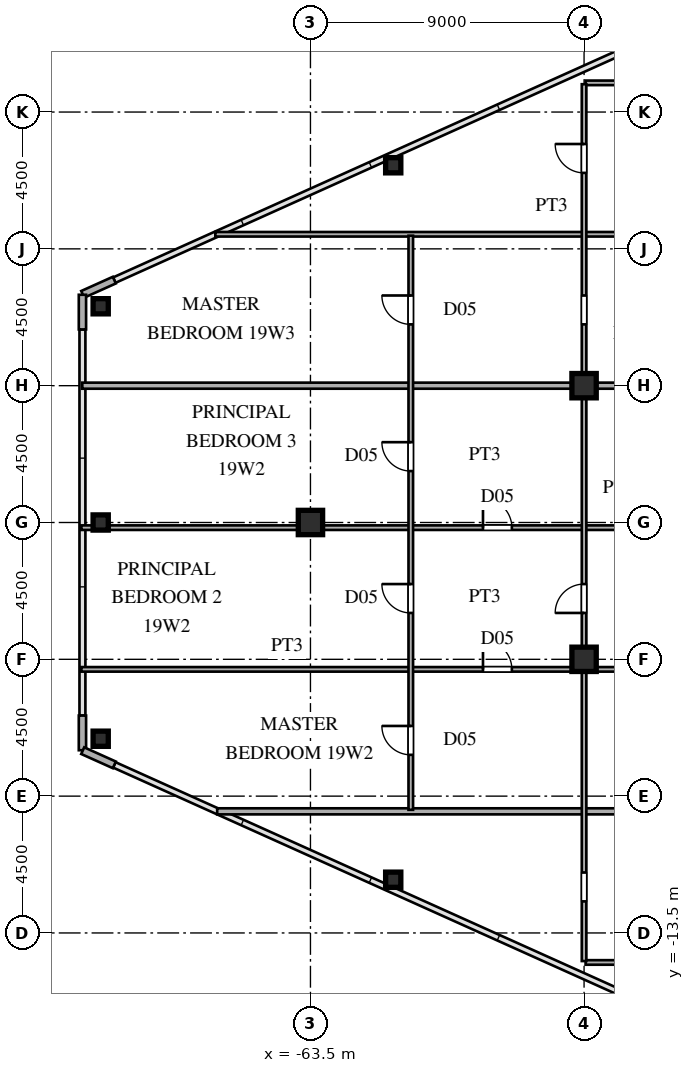
"""IFC4 building model, lengths in metres.
Left out: names, types, materials, properties, quantities, classifications, styles, units other than length and angle.
Written with IfcOpenShell. Run it as: python <this file> out.ifc"""

import sys

from ifc_helpers import new_model, si_unit, direction, frame, frame_2d, origin, origin_2d, place, context, subcontext, project, spatial, rectangle, hollow_rectangle, i_section, extrude, source, transform, mapped, element, fill, save


model = new_model("IFC4")
c1 = context("Model", 3, precision=1e-05, world=origin(), true_north=direction((0.0, 1.0)))
c2 = subcontext(c1, "Body", "Model", "MODEL_VIEW")
j1 = project(units=[si_unit("LENGTHUNIT", "METRE"), si_unit("PLANEANGLEUNIT", "RADIAN")], contexts=[c1])
p1 = place(None, origin())
s1 = spatial("IfcSite", under=j1, at=p1, CompositionType="ELEMENT")
p2 = place(p1, origin())
s2 = spatial("IfcBuilding", under=s1, at=p2, CompositionType="ELEMENT")
p3 = place(p2, frame((0.0, 0.0, 72.9)))
s3 = spatial("IfcBuildingStorey", under=s2, at=p3, CompositionType="ELEMENT", Elevation=72.9)
m1 = source(origin(), c2, "Body", "SweptSolid", [
    extrude(i_section(OverallWidth=0.8, OverallDepth=0.8, WebThickness=0.032, FlangeThickness=0.05, at=origin_2d()), origin(), (0.0, 0.0, 1.0), 3.6),
])
for number, where, z_axis, x_axis in (
    (1, (-54.5, -4.5, 0.0), (0.0, 0.0, 1.0), (1.0, 0.0, 0.0)),
    (2, (-54.5, 4.5, 0.0), (0.0, 0.0, 1.0), (1.0, 0.0, 0.0)),
    (3, (-63.5, 0.0, 0.0), (0.0, 0.0, 1.0), (1.0, 0.0, 0.0)),
):
    element("IfcColumn", number, at=place(p3, frame(where, z_axis=z_axis, x_axis=x_axis)), inside=s3, PredefinedType="COLUMN", context=c2, shape_type="MappedRepresentation", body=[
        mapped(m1, transform((0.0, 0.0, 0.0), scale=1.0)),
    ])
m2 = source(origin(), c2, "Body", "SweptSolid", [
    extrude(hollow_rectangle(XDim=0.5, YDim=0.5, WallThickness=0.02, at=origin_2d()), origin(), (0.0, 0.0, 1.0), 3.6),
])
for number, where, z_axis, x_axis in (
    (4, (-70.4, 7.112, 0.0), (0.0, 0.0, 1.0), (1.0, 0.0, 0.0)),
    (5, (-70.4, -7.112, 0.0), (0.0, 0.0, 1.0), (1.0, 0.0, 0.0)),
    (6, (-60.778, -11.749, 0.0), (0.0, 0.0, 1.0), (1.0, 0.0, 0.0)),
    (7, (-60.778, 11.749, 0.0), (0.0, 0.0, 1.0), (1.0, 0.0, 0.0)),
    (8, (-70.4, 0.0, 0.0), (0.0, 0.0, 1.0), (1.0, 0.0, 0.0)),
):
    element("IfcColumn", number, at=place(p3, frame(where, z_axis=z_axis, x_axis=x_axis)), inside=s3, PredefinedType="COLUMN", context=c2, shape_type="MappedRepresentation", body=[
        mapped(m2, transform((0.0, 0.0, 0.0), scale=1.0)),
    ])
for number, where, z_axis, x_axis in (
    (9, (-69.951, 7.972, 0.0), (0.0, 0.0, 1.0), (-0.912, -0.41, 0.0)),
    (10, (-71.0, 7.49, 0.0), (0.0, 0.0, 1.0), (0.0, -1.0, 0.0)),
    (11, (-71.0, -6.35, 0.0), (0.0, 0.0, 1.0), (0.0, -1.0, 0.0)),
    (12, (-70.991, -7.504, 0.0), (0.0, 0.0, 1.0), (0.912, -0.41, 0.0)),
):
    element("IfcWall", number, at=place(p3, frame(where, z_axis=z_axis, x_axis=x_axis)), inside=s3, PredefinedType="SOLIDWALL", context=c2, shape_type="SweptSolid", body=[
        extrude(rectangle(XDim=1.14, YDim=0.24, at=frame_2d((0.57, 0.0))), origin(), (0.0, 0.0, 1.0), 3.38),
    ])
p4 = place(p3, frame((-54.45, -14.47, 0.0), z_axis=(0.0, 0.0, 1.0), x_axis=(1.0, 0.0, 0.0)))
e13 = element("IfcWall", 13, at=p4, inside=s3, PredefinedType="PARTITIONING", context=c2, shape_type="SweptSolid", body=[
    extrude(rectangle(XDim=9.95, YDim=0.15, at=frame_2d((4.975, 0.0))), origin(), (0.0, 0.0, 1.0), 3.38),
])
p5 = place(p4, frame((4.5, 0.0, 0.0)))
e14 = element("IfcOpeningElement", 14, at=p5, cuts=e13, PredefinedType="OPENING", context=c2, shape_type="SweptSolid", body=[
    extrude(rectangle(XDim=0.95, YDim=2.15, at=frame_2d((0.475, 1.075))), frame((0.0, 0.085, 0.0), z_axis=(0.0, -1.0, 0.0), x_axis=(1.0, 0.0, 0.0)), (0.0, 0.0, 1.0), 0.17),
])
p6 = place(p3, frame((-66.568, -9.5, 0.0), z_axis=(0.0, 0.0, 1.0), x_axis=(1.0, 0.0, 0.0)))
e15 = element("IfcWall", 15, at=p6, inside=s3, PredefinedType="PARTITIONING", context=c2, shape_type="SweptSolid", body=[
    extrude(rectangle(XDim=28.188, YDim=0.2, at=frame_2d((14.094, 0.0))), origin(), (0.0, 0.0, 1.0), 3.38),
])
p7 = place(p3, frame((-71.035, -4.83, 0.0), z_axis=(0.0, 0.0, 1.0), x_axis=(1.0, 0.0, 0.0)))
e16 = element("IfcWall", 16, at=p7, inside=s3, PredefinedType="PARTITIONING", context=c2, shape_type="SweptSolid", body=[
    extrude(rectangle(XDim=26.535, YDim=0.15, at=frame_2d((13.268, 0.0))), origin(), (0.0, 0.0, 1.0), 3.38),
])
p8 = place(p7, frame((21.085, 0.0, 0.0)))
e17 = element("IfcOpeningElement", 17, at=p8, cuts=e16, PredefinedType="OPENING", context=c2, shape_type="SweptSolid", body=[
    extrude(rectangle(XDim=0.95, YDim=2.15, at=frame_2d((0.475, 1.075))), frame((0.0, 0.085, 0.0), z_axis=(0.0, -1.0, 0.0), x_axis=(1.0, 0.0, 0.0)), (0.0, 0.0, 1.0), 0.17),
])
p9 = place(p7, frame((13.21, 0.0, 0.0)))
e18 = element("IfcOpeningElement", 18, at=p9, cuts=e16, PredefinedType="OPENING", context=c2, shape_type="SweptSolid", body=[
    extrude(rectangle(XDim=0.95, YDim=2.15, at=frame_2d((0.475, 1.075))), frame((0.0, 0.085, 0.0), z_axis=(0.0, -1.0, 0.0), x_axis=(1.0, 0.0, 0.0)), (0.0, 0.0, 1.0), 0.17),
])
p10 = place(p3, frame((-71.035, -0.17, 0.0), z_axis=(0.0, 0.0, 1.0), x_axis=(1.0, 0.0, 0.0)))
e19 = element("IfcWall", 19, at=p10, inside=s3, PredefinedType="PARTITIONING", context=c2, shape_type="SweptSolid", body=[
    extrude(rectangle(XDim=26.535, YDim=0.15, at=frame_2d((13.268, 0.0))), origin(), (0.0, 0.0, 1.0), 3.38),
])
p11 = place(p10, frame((21.085, 0.0, 0.0)))
e20 = element("IfcOpeningElement", 20, at=p11, cuts=e19, PredefinedType="OPENING", context=c2, shape_type="SweptSolid", body=[
    extrude(rectangle(XDim=0.95, YDim=2.15, at=frame_2d((0.475, 1.075))), frame((0.0, 0.085, 0.0), z_axis=(0.0, -1.0, 0.0), x_axis=(1.0, 0.0, 0.0)), (0.0, 0.0, 1.0), 0.17),
])
p12 = place(p10, frame((13.21, 0.0, 0.0)))
e21 = element("IfcOpeningElement", 21, at=p12, cuts=e19, PredefinedType="OPENING", context=c2, shape_type="SweptSolid", body=[
    extrude(rectangle(XDim=0.95, YDim=2.15, at=frame_2d((0.475, 1.075))), frame((0.0, 0.085, 0.0), z_axis=(0.0, -1.0, 0.0), x_axis=(1.0, 0.0, 0.0)), (0.0, 0.0, 1.0), 0.17),
])
p13 = place(p3, frame((-71.005, 4.5, 0.0), z_axis=(0.0, 0.0, 1.0), x_axis=(1.0, 0.0, 0.0)))
e22 = element("IfcWall", 22, at=p13, inside=s3, PredefinedType="PARTITIONING", context=c2, shape_type="SweptSolid", body=[
    extrude(rectangle(XDim=16.485, YDim=0.2, at=frame_2d((8.242, 0.0))), origin(), (0.0, 0.0, 1.0), 3.38),
])
p14 = place(p3, frame((-54.52, 4.5, 0.0), z_axis=(0.0, 0.0, 1.0), x_axis=(1.0, 0.0, 0.0)))
e23 = element("IfcWall", 23, at=p14, inside=s3, PredefinedType="PARTITIONING", context=c2, shape_type="SweptSolid", body=[
    extrude(rectangle(XDim=16.14, YDim=0.2, at=frame_2d((8.07, 0.0))), origin(), (0.0, 0.0, 1.0), 2.68),
])
p15 = place(p3, frame((-66.629, 9.48, 0.0), z_axis=(0.0, 0.0, 1.0), x_axis=(1.0, 0.0, 0.0)))
e24 = element("IfcWall", 24, at=p15, inside=s3, PredefinedType="PARTITIONING", context=c2, shape_type="SweptSolid", body=[
    extrude(rectangle(XDim=22.129, YDim=0.15, at=frame_2d((11.064, 0.0))), origin(), (0.0, 0.0, 1.0), 3.38),
])
p16 = place(p15, frame((16.679, 0.0, 0.0)))
e25 = element("IfcOpeningElement", 25, at=p16, cuts=e24, PredefinedType="OPENING", context=c2, shape_type="SweptSolid", body=[
    extrude(rectangle(XDim=0.95, YDim=2.15, at=frame_2d((0.475, 1.075))), frame((0.0, 0.085, 0.0), z_axis=(0.0, -1.0, 0.0), x_axis=(1.0, 0.0, 0.0)), (0.0, 0.0, 1.0), 0.17),
])
p17 = place(p3, frame((-54.45, 14.46, 0.0), z_axis=(0.0, 0.0, 1.0), x_axis=(1.0, 0.0, 0.0)))
e26 = element("IfcWall", 26, at=p17, inside=s3, PredefinedType="PARTITIONING", context=c2, shape_type="SweptSolid", body=[
    extrude(rectangle(XDim=9.95, YDim=0.15, at=frame_2d((4.975, 0.0))), origin(), (0.0, 0.0, 1.0), 3.38),
])
p18 = place(p17, frame((4.5, 0.0, 0.0)))
e27 = element("IfcOpeningElement", 27, at=p18, cuts=e26, PredefinedType="OPENING", context=c2, shape_type="SweptSolid", body=[
    extrude(rectangle(XDim=0.95, YDim=2.15, at=frame_2d((0.475, 1.075))), frame((0.0, 0.085, 0.0), z_axis=(0.0, -1.0, 0.0), x_axis=(1.0, 0.0, 0.0)), (0.0, 0.0, 1.0), 0.17),
])
p19 = place(p3, frame((-60.2, -9.45, 0.0), z_axis=(0.0, 0.0, 1.0), x_axis=(0.0, 1.0, 0.0)))
e28 = element("IfcWall", 28, at=p19, inside=s3, PredefinedType="PARTITIONING", context=c2, shape_type="SweptSolid", body=[
    extrude(rectangle(XDim=18.883, YDim=0.15, at=frame_2d((9.441, 0.0))), origin(), (0.0, 0.0, 1.0), 3.38),
])
p20 = place(p19, frame((1.808, 0.0, 0.0)))
e29 = element("IfcOpeningElement", 29, at=p20, cuts=e28, PredefinedType="OPENING", context=c2, shape_type="SweptSolid", body=[
    extrude(rectangle(XDim=0.95, YDim=2.15, at=frame_2d((0.475, 1.075))), frame((0.0, 0.085, 0.0), z_axis=(0.0, -1.0, 0.0), x_axis=(1.0, 0.0, 0.0)), (0.0, 0.0, 1.0), 0.17),
])
p21 = place(p19, frame((6.475, 0.0, 0.0)))
e30 = element("IfcOpeningElement", 30, at=p21, cuts=e28, PredefinedType="OPENING", context=c2, shape_type="SweptSolid", body=[
    extrude(rectangle(XDim=0.95, YDim=2.15, at=frame_2d((0.475, 1.075))), frame((0.0, 0.085, 0.0), z_axis=(0.0, -1.0, 0.0), x_axis=(1.0, 0.0, 0.0)), (0.0, 0.0, 1.0), 0.17),
])
p22 = place(p19, frame((11.142, 0.0, 0.0)))
e31 = element("IfcOpeningElement", 31, at=p22, cuts=e28, PredefinedType="OPENING", context=c2, shape_type="SweptSolid", body=[
    extrude(rectangle(XDim=0.95, YDim=2.15, at=frame_2d((0.475, 1.075))), frame((0.0, 0.085, 0.0), z_axis=(0.0, -1.0, 0.0), x_axis=(1.0, 0.0, 0.0)), (0.0, 0.0, 1.0), 0.17),
])
p23 = place(p19, frame((15.966, 0.0, 0.0)))
e32 = element("IfcOpeningElement", 32, at=p23, cuts=e28, PredefinedType="OPENING", context=c2, shape_type="SweptSolid", body=[
    extrude(rectangle(XDim=0.95, YDim=2.15, at=frame_2d((0.475, 1.075))), frame((0.0, 0.085, 0.0), z_axis=(0.0, -1.0, 0.0), x_axis=(1.0, 0.0, 0.0)), (0.0, 0.0, 1.0), 0.17),
])
p24 = place(p3, frame((-54.5, -14.424, 0.0), z_axis=(0.0, 0.0, 1.0), x_axis=(0.0, 1.0, 0.0)))
e33 = element("IfcWall", 33, at=p24, inside=s3, PredefinedType="PARTITIONING", context=c2, shape_type="SweptSolid", body=[
    extrude(rectangle(XDim=28.839, YDim=0.15, at=frame_2d((14.419, 0.0))), origin(), (0.0, 0.0, 1.0), 2.68),
])
p25 = place(p24, frame((1.962, 0.0, 0.0)))
e34 = element("IfcOpeningElement", 34, at=p25, cuts=e33, PredefinedType="OPENING", context=c2, shape_type="SweptSolid", body=[
    extrude(rectangle(XDim=0.95, YDim=2.15, at=frame_2d((0.475, 1.075))), frame((0.0, 0.085, 0.0), z_axis=(0.0, -1.0, 0.0), x_axis=(1.0, 0.0, 0.0)), (0.0, 0.0, 1.0), 0.17),
])
p26 = place(p24, frame((11.449, 0.0, 0.0)))
e35 = element("IfcOpeningElement", 35, at=p26, cuts=e33, PredefinedType="OPENING", context=c2, shape_type="SweptSolid", body=[
    extrude(rectangle(XDim=0.95, YDim=2.15, at=frame_2d((0.475, 1.075))), frame((0.0, 0.085, 0.0), z_axis=(0.0, -1.0, 0.0), x_axis=(1.0, 0.0, 0.0)), (0.0, 0.0, 1.0), 0.17),
])
p27 = place(p24, frame((25.923, 0.0, 0.0)))
e36 = element("IfcOpeningElement", 36, at=p27, cuts=e33, PredefinedType="OPENING", context=c2, shape_type="SweptSolid", body=[
    extrude(rectangle(XDim=0.95, YDim=2.15, at=frame_2d((0.475, 1.075))), frame((0.0, 0.085, 0.0), z_axis=(0.0, -1.0, 0.0), x_axis=(1.0, 0.0, 0.0)), (0.0, 0.0, 1.0), 0.17),
])
p28 = place(p24, frame((20.94, 0.0, 0.0)))
e37 = element("IfcOpeningElement", 37, at=p28, cuts=e33, PredefinedType="OPENING", context=c2, shape_type="SweptSolid", body=[
    extrude(rectangle(XDim=0.95, YDim=2.15, at=frame_2d((0.475, 1.075))), frame((0.0, 0.085, 0.0), z_axis=(0.0, -1.0, 0.0), x_axis=(1.0, 0.0, 0.0)), (0.0, 0.0, 1.0), 0.17),
])
m3 = source(origin(), c2, "Body", "SweptSolid", [
    extrude(rectangle(XDim=0.95, YDim=2.15, at=frame_2d((0.475, 1.075))), frame((0.0, 0.025, 0.0), z_axis=(0.0, -1.0, 0.0), x_axis=(1.0, 0.0, 0.0)), (0.0, 0.0, 1.0), 0.05),
])
p29 = place(p9, origin())
e38 = element("IfcDoor", 38, at=p29, inside=s3, OperationType="SINGLE_SWING_LEFT", PredefinedType="DOOR", context=c2, shape_type="MappedRepresentation", body=[
    mapped(m3, transform((0.0, 0.0, 0.0), scale=1.0)),
])
fill(e18, e38)
p30 = place(p12, origin())
e39 = element("IfcDoor", 39, at=p30, inside=s3, OperationType="SINGLE_SWING_LEFT", PredefinedType="DOOR", context=c2, shape_type="MappedRepresentation", body=[
    mapped(m3, transform((0.0, 0.0, 0.0), scale=1.0)),
])
fill(e21, e39)
p31 = place(p20, origin())
e40 = element("IfcDoor", 40, at=p31, inside=s3, OperationType="SINGLE_SWING_RIGHT", PredefinedType="DOOR", context=c2, shape_type="MappedRepresentation", body=[
    mapped(m3, transform((0.0, 0.0, 0.0), scale=1.0)),
])
fill(e29, e40)
p32 = place(p21, origin())
e41 = element("IfcDoor", 41, at=p32, inside=s3, OperationType="SINGLE_SWING_RIGHT", PredefinedType="DOOR", context=c2, shape_type="MappedRepresentation", body=[
    mapped(m3, transform((0.0, 0.0, 0.0), scale=1.0)),
])
fill(e30, e41)
p33 = place(p22, origin())
e42 = element("IfcDoor", 42, at=p33, inside=s3, OperationType="SINGLE_SWING_RIGHT", PredefinedType="DOOR", context=c2, shape_type="MappedRepresentation", body=[
    mapped(m3, transform((0.0, 0.0, 0.0), scale=1.0)),
])
fill(e31, e42)
p34 = place(p23, origin())
e43 = element("IfcDoor", 43, at=p34, inside=s3, OperationType="SINGLE_SWING_RIGHT", PredefinedType="DOOR", context=c2, shape_type="MappedRepresentation", body=[
    mapped(m3, transform((0.0, 0.0, 0.0), scale=1.0)),
])
fill(e32, e43)
p35 = place(p26, origin())
e44 = element("IfcDoor", 44, at=p35, inside=s3, OperationType="SINGLE_SWING_LEFT", PredefinedType="DOOR", context=c2, shape_type="MappedRepresentation", body=[
    mapped(m3, transform((0.0, 0.0, 0.0), scale=1.0)),
])
fill(e35, e44)
p36 = place(p27, origin())
e45 = element("IfcDoor", 45, at=p36, inside=s3, OperationType="SINGLE_SWING_RIGHT", PredefinedType="DOOR", context=c2, shape_type="MappedRepresentation", body=[
    mapped(m3, transform((0.0, 0.0, 0.0), scale=1.0)),
])
fill(e36, e45)
save(model, sys.argv[1])
